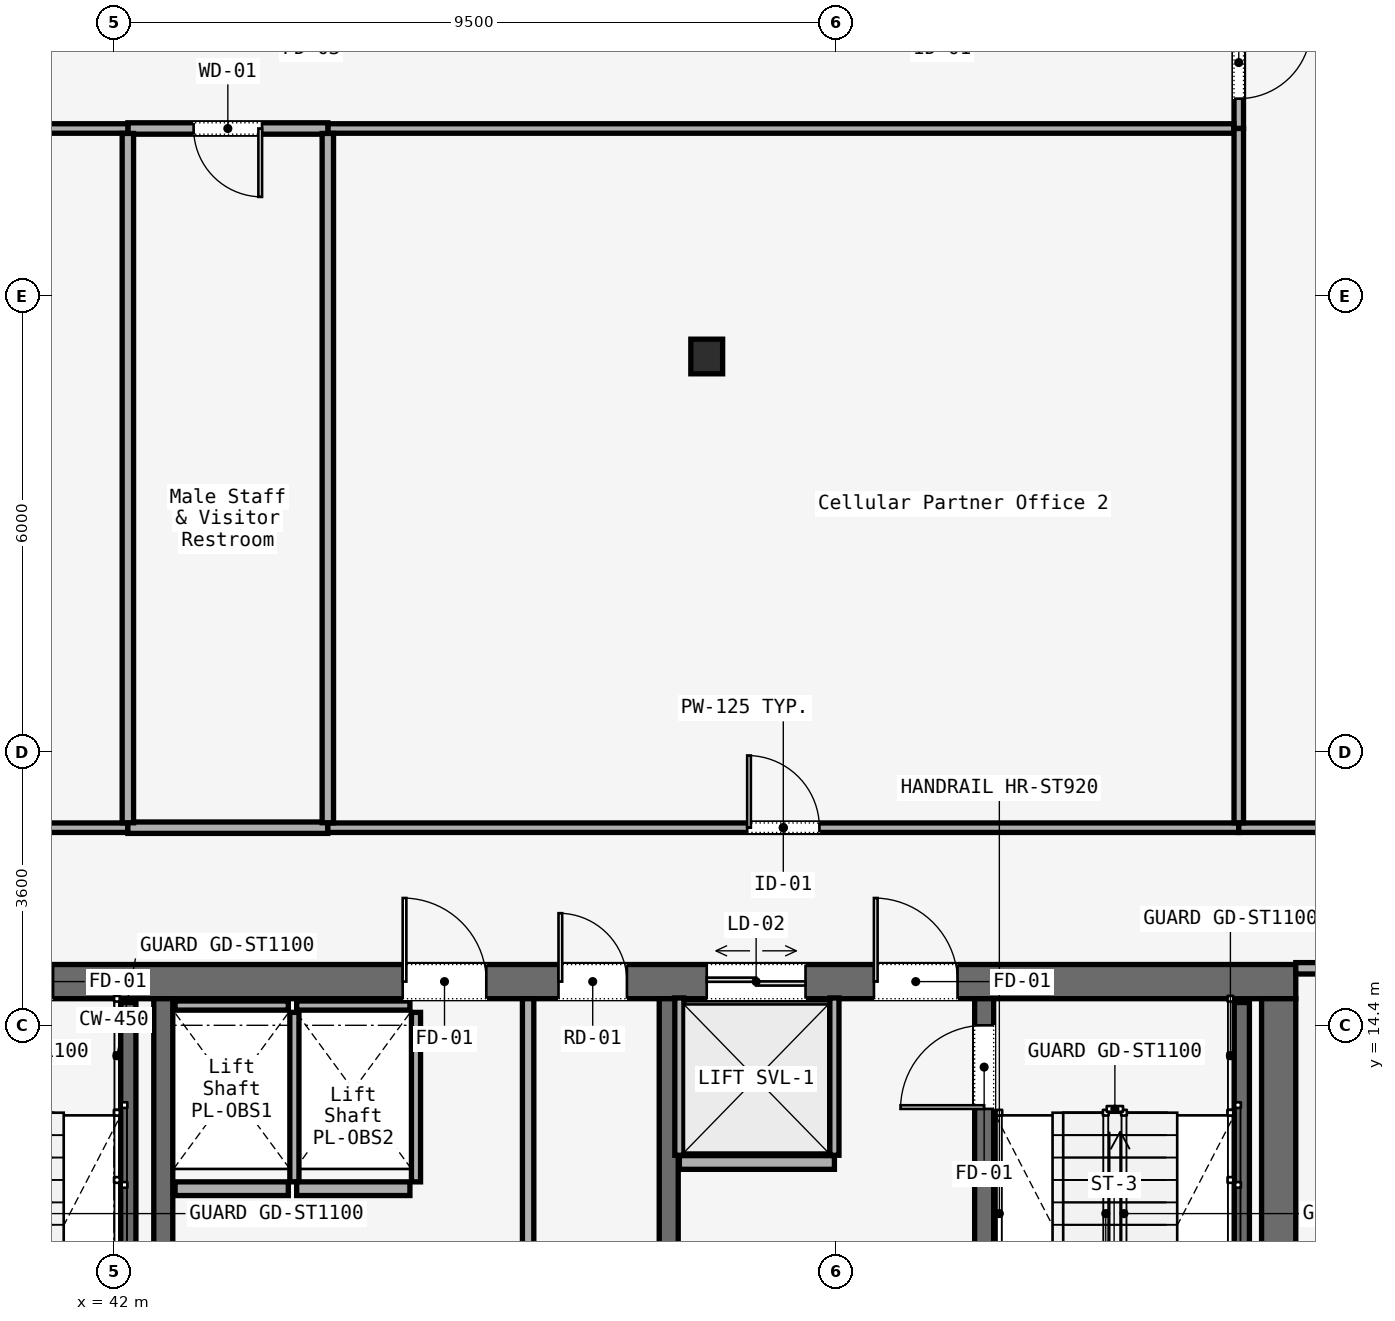
"""IFC4 building model, lengths in metres.
Left out: names, types, materials, properties, quantities, classifications, styles, units other than length and angle.
Written with IfcOpenShell. Run it as: python <this file> out.ifc"""

import sys

from ifc_helpers import new_model, si_unit, direction, frame, frame_2d, origin, origin_2d, place, context, subcontext, project, spatial, rectangle, i_section, extrude, element, fill, save


model = new_model("IFC4")
c1 = context("Model", 3, precision=1e-05, world=origin(), true_north=direction((0.0, 1.0)))
c2 = subcontext(c1, "Body", "Model", "MODEL_VIEW")
j1 = project(units=[si_unit("LENGTHUNIT", "METRE"), si_unit("PLANEANGLEUNIT", "RADIAN")], contexts=[c1])
p1 = place(None, origin())
s1 = spatial("IfcSite", under=j1, at=p1, CompositionType="ELEMENT")
p2 = place(p1, origin())
s2 = spatial("IfcBuilding", under=s1, at=p2, CompositionType="ELEMENT")
p3 = place(p2, frame((0.0, 0.0, 62.6)))
s3 = spatial("IfcBuildingStorey", under=s2, at=p3, CompositionType="ELEMENT", Elevation=62.6)
p4 = place(p3, frame((26.45, 14.975, 0.0), z_axis=(0.0, 0.0, 1.0), x_axis=(1.0, 0.0, 0.0)))
e1 = element("IfcWall", 1, at=p4, inside=s3, PredefinedType="SOLIDWALL", context=c2, shape_type="SweptSolid", body=[
    extrude(rectangle(XDim=31.1, YDim=0.45, at=frame_2d((15.55, 0.0))), origin(), (0.0, 0.0, 1.0), 3.58),
])
p5 = place(p4, frame((1.65, 0.0, 0.0)))
e2 = element("IfcOpeningElement", 2, at=p5, cuts=e1, PredefinedType="OPENING", context=c2, shape_type="SweptSolid", body=[
    extrude(rectangle(XDim=1.1, YDim=2.2, at=frame_2d((0.55, 1.1))), frame((0.0, 0.225, 0.0), z_axis=(0.0, -1.0, 0.0), x_axis=(1.0, 0.0, 0.0)), (0.0, 0.0, 1.0), 0.45),
])
p6 = place(p4, frame((13.65, 0.0, 0.0)))
e3 = element("IfcOpeningElement", 3, at=p6, cuts=e1, PredefinedType="OPENING", context=c2, shape_type="SweptSolid", body=[
    extrude(rectangle(XDim=1.1, YDim=2.2, at=frame_2d((0.55, 1.1))), frame((0.0, 0.225, 0.0), z_axis=(0.0, -1.0, 0.0), x_axis=(1.0, 0.0, 0.0)), (0.0, 0.0, 1.0), 0.45),
])
p7 = place(p4, frame((25.55, 0.0, 0.0)))
e4 = element("IfcOpeningElement", 4, at=p7, cuts=e1, PredefinedType="OPENING", context=c2, shape_type="SweptSolid", body=[
    extrude(rectangle(XDim=1.1, YDim=2.2, at=frame_2d((0.55, 1.1))), frame((0.0, 0.225, 0.0), z_axis=(0.0, -1.0, 0.0), x_axis=(1.0, 0.0, 0.0)), (0.0, 0.0, 1.0), 0.45),
])
p8 = place(p4, frame((10.7, 0.0, 0.0)))
e5 = element("IfcOpeningElement", 5, at=p8, cuts=e1, PredefinedType="OPENING", context=c2, shape_type="SweptSolid", body=[
    extrude(rectangle(XDim=1.4, YDim=2.2, at=frame_2d((0.7, 1.1))), frame((0.0, 0.225, 0.0), z_axis=(0.0, -1.0, 0.0), x_axis=(1.0, 0.0, 0.0)), (0.0, 0.0, 1.0), 0.45),
])
p9 = place(p4, frame((19.35, 0.0, 0.0)))
e6 = element("IfcOpeningElement", 6, at=p9, cuts=e1, PredefinedType="OPENING", context=c2, shape_type="SweptSolid", body=[
    extrude(rectangle(XDim=1.1, YDim=2.2, at=frame_2d((0.55, 1.1))), frame((0.0, 0.225, 0.0), z_axis=(0.0, -1.0, 0.0), x_axis=(1.0, 0.0, 0.0)), (0.0, 0.0, 1.0), 0.45),
])
p10 = place(p4, frame((21.4, 0.0, 0.0)))
e7 = element("IfcOpeningElement", 7, at=p10, cuts=e1, PredefinedType="OPENING", context=c2, shape_type="SweptSolid", body=[
    extrude(rectangle(XDim=0.9, YDim=2.1, at=frame_2d((0.45, 1.05))), frame((0.0, 0.225, 0.0), z_axis=(0.0, -1.0, 0.0), x_axis=(1.0, 0.0, 0.0)), (0.0, 0.0, 1.0), 0.45),
])
p11 = place(p4, frame((23.35, 0.0, 0.0)))
e8 = element("IfcOpeningElement", 8, at=p11, cuts=e1, PredefinedType="OPENING", context=c2, shape_type="SweptSolid", body=[
    extrude(rectangle(XDim=1.3, YDim=2.3, at=frame_2d((0.65, 1.15))), frame((0.0, 0.225, 0.0), z_axis=(0.0, -1.0, 0.0), x_axis=(1.0, 0.0, 0.0)), (0.0, 0.0, 1.0), 0.45),
])
p12 = place(p3, frame((57.325, 5.85, 0.0), z_axis=(0.0, 0.0, 1.0), x_axis=(0.0, 1.0, 0.0)))
e9 = element("IfcWall", 9, at=p12, inside=s3, PredefinedType="SOLIDWALL", context=c2, shape_type="SweptSolid", body=[
    extrude(rectangle(XDim=8.9, YDim=0.45, at=frame_2d((4.45, 0.0))), origin(), (0.0, 0.0, 1.0), 3.58),
])
for number, where, z_axis, x_axis in (
    (10, (42.65, 5.85, 0.0), (0.0, 0.0, 1.0), (0.0, 1.0, 0.0)),
    (11, (49.3, 5.85, 0.0), (0.0, 0.0, 1.0), (0.0, 1.0, 0.0)),
):
    element("IfcWall", number, at=place(p3, frame(where, z_axis=z_axis, x_axis=x_axis)), inside=s3, PredefinedType="SOLIDWALL", context=c2, shape_type="SweptSolid", body=[
        extrude(rectangle(XDim=8.9, YDim=0.25, at=frame_2d((4.45, 0.0))), origin(), (0.0, 0.0, 1.0), 3.58),
    ])
p13 = place(p3, frame((53.45, 5.85, 0.0), z_axis=(0.0, 0.0, 1.0), x_axis=(0.0, 1.0, 0.0)))
e12 = element("IfcWall", 12, at=p13, inside=s3, PredefinedType="SOLIDWALL", context=c2, shape_type="SweptSolid", body=[
    extrude(rectangle(XDim=8.9, YDim=0.25, at=frame_2d((4.45, 0.0))), origin(), (0.0, 0.0, 1.0), 3.58),
])
p14 = place(p13, frame((7.45, 0.0, 0.0)))
e13 = element("IfcOpeningElement", 13, at=p14, cuts=e12, PredefinedType="OPENING", context=c2, shape_type="SweptSolid", body=[
    extrude(rectangle(XDim=1.1, YDim=2.2, at=frame_2d((0.55, 1.1))), frame((0.0, 0.125, 0.0), z_axis=(0.0, -1.0, 0.0), x_axis=(1.0, 0.0, 0.0)), (0.0, 0.0, 1.0), 0.25),
])
p15 = place(p3, frame((49.8, 23.2, 0.0), z_axis=(0.0, 0.0, 1.0), x_axis=(1.0, 0.0, 0.0)))
e14 = element("IfcColumn", 14, at=p15, inside=s3, PredefinedType="COLUMN", context=c2, shape_type="SweptSolid", body=[
    extrude(i_section(OverallWidth=0.418, OverallDepth=0.456, WebThickness=0.042, FlangeThickness=0.067, FilletRadius=0.015, at=origin_2d()), origin(), (0.0, 0.0, 1.0), 3.58),
])
for number, where, z_axis, x_axis in (
    (15, (42.19, 14.7, 0.0), (0.0, 0.0, 1.0), (0.0, -1.0, 0.0)),
    (16, (56.84, 14.7, 0.0), (0.0, 0.0, 1.0), (0.0, -1.0, 0.0)),
):
    element("IfcWall", number, at=place(p3, frame(where, z_axis=z_axis, x_axis=x_axis)), inside=s3, PredefinedType="SOLIDWALL", context=c2, shape_type="SweptSolid", body=[
        extrude(rectangle(XDim=7.65, YDim=0.2, at=frame_2d((3.825, 0.0))), origin(), (0.0, 0.0, 1.0), 3.8),
    ])
p16 = place(p3, frame((47.45, 5.9, 0.0), z_axis=(0.0, 0.0, 1.0), x_axis=(0.0, 1.0, 0.0)))
e17 = element("IfcWall", 17, at=p16, inside=s3, PredefinedType="PARTITIONING", context=c2, shape_type="SweptSolid", body=[
    extrude(rectangle(XDim=8.85, YDim=0.15, at=frame_2d((4.425, 0.0))), origin(), (0.0, 0.0, 1.0), 2.933),
])
p17 = place(p3, frame((42.805, 12.25, 0.0), z_axis=(0.0, 0.0, 1.0), x_axis=(1.0, 0.0, 0.0)))
e18 = element("IfcWall", 18, at=p17, inside=s3, PredefinedType="SOLIDWALL", context=c2, shape_type="SweptSolid", body=[
    extrude(rectangle(XDim=1.49, YDim=0.18, at=frame_2d((0.745, 0.0))), origin(), (0.0, 0.0, 1.0), 2.933),
])
p18 = place(p3, frame((42.805, 14.66, 0.0), z_axis=(0.0, 0.0, 1.0), x_axis=(1.0, 0.0, 0.0)))
e19 = element("IfcWall", 19, at=p18, inside=s3, PredefinedType="SOLIDWALL", context=c2, shape_type="SweptSolid", body=[
    extrude(rectangle(XDim=1.49, YDim=0.12, at=frame_2d((0.745, 0.0))), origin(), (0.0, 0.0, 1.0), 2.933),
])
p19 = place(p3, frame((44.375, 12.34, 0.0), z_axis=(0.0, 0.0, 1.0), x_axis=(0.0, 1.0, 0.0)))
e20 = element("IfcWall", 20, at=p19, inside=s3, PredefinedType="SOLIDWALL", context=c2, shape_type="SweptSolid", body=[
    extrude(rectangle(XDim=2.23, YDim=0.12, at=frame_2d((1.115, 0.0))), origin(), (0.0, 0.0, 1.0), 2.933),
])
p20 = place(p3, frame((44.405, 12.25, 0.0), z_axis=(0.0, 0.0, 1.0), x_axis=(1.0, 0.0, 0.0)))
e21 = element("IfcWall", 21, at=p20, inside=s3, PredefinedType="SOLIDWALL", context=c2, shape_type="SweptSolid", body=[
    extrude(rectangle(XDim=1.49, YDim=0.18, at=frame_2d((0.745, 0.0))), origin(), (0.0, 0.0, 1.0), 2.933),
])
p21 = place(p3, frame((44.405, 14.66, 0.0), z_axis=(0.0, 0.0, 1.0), x_axis=(1.0, 0.0, 0.0)))
e22 = element("IfcWall", 22, at=p21, inside=s3, PredefinedType="SOLIDWALL", context=c2, shape_type="SweptSolid", body=[
    extrude(rectangle(XDim=1.49, YDim=0.12, at=frame_2d((0.745, 0.0))), origin(), (0.0, 0.0, 1.0), 2.933),
])
p22 = place(p3, frame((45.975, 12.34, 0.0), z_axis=(0.0, 0.0, 1.0), x_axis=(0.0, 1.0, 0.0)))
e23 = element("IfcWall", 23, at=p22, inside=s3, PredefinedType="SOLIDWALL", context=c2, shape_type="SweptSolid", body=[
    extrude(rectangle(XDim=2.23, YDim=0.12, at=frame_2d((1.115, 0.0))), origin(), (0.0, 0.0, 1.0), 2.933),
])
p23 = place(p3, frame((49.44, 12.595, 0.0), z_axis=(0.0, 0.0, 1.0), x_axis=(1.0, 0.0, 0.0)))
e24 = element("IfcWall", 24, at=p23, inside=s3, PredefinedType="SOLIDWALL", context=c2, shape_type="SweptSolid", body=[
    extrude(rectangle(XDim=2.04, YDim=0.18, at=frame_2d((1.02, 0.0))), origin(), (0.0, 0.0, 1.0), 2.933),
])
for number, where, z_axis, x_axis in (
    (25, (49.44, 12.69, 0.0), (0.0, 0.0, 1.0), (0.0, 1.0, 0.0)),
    (26, (51.48, 12.69, 0.0), (0.0, 0.0, 1.0), (0.0, 1.0, 0.0)),
):
    element("IfcWall", number, at=place(p3, frame(where, z_axis=z_axis, x_axis=x_axis)), inside=s3, PredefinedType="SOLIDWALL", context=c2, shape_type="SweptSolid", body=[
        extrude(rectangle(XDim=2.07, YDim=0.12, at=frame_2d((1.035, 0.0))), origin(), (0.0, 0.0, 1.0), 2.933),
    ])
p24 = place(p3, frame((58.335, 15.15, 0.0), z_axis=(0.0, 0.0, 1.0), x_axis=(-1.0, 0.0, 0.0)))
e27 = element("IfcWall", 27, at=p24, inside=s3, PredefinedType="PARTITIONING", context=c2, shape_type="SweptSolid", body=[
    extrude(rectangle(XDim=0.785, YDim=0.15, at=frame_2d((0.393, 0.0))), origin(), (0.0, 0.0, 1.0), 2.933),
])
p25 = place(p3, frame((56.8, 27.935, 0.0), z_axis=(0.0, 0.0, 1.0), x_axis=(0.0, -1.0, 0.0)))
e28 = element("IfcWall", 28, at=p25, inside=s3, PredefinedType="PARTITIONING", context=c2, shape_type="SweptSolid", body=[
    extrude(rectangle(XDim=1.735, YDim=0.125, at=frame_2d((0.868, 0.0))), origin(), (0.0, 0.0, 1.0), 2.933),
])
p26 = place(p25, frame((0.393, 0.0, 0.0)))
e29 = element("IfcOpeningElement", 29, at=p26, cuts=e28, PredefinedType="OPENING", context=c2, shape_type="SweptSolid", body=[
    extrude(rectangle(XDim=0.95, YDim=2.2, at=frame_2d((0.475, 1.1))), frame((0.0, 0.062, 0.0), z_axis=(0.0, -1.0, 0.0), x_axis=(1.0, 0.0, 0.0)), (0.0, 0.0, 1.0), 0.125),
])
p27 = place(p3, frame((56.735, 26.2, 0.0), z_axis=(0.0, 0.0, 1.0), x_axis=(-1.0, 0.0, 0.0)))
e30 = element("IfcWall", 30, at=p27, inside=s3, PredefinedType="PARTITIONING", context=c2, shape_type="SweptSolid", body=[
    extrude(rectangle(XDim=11.92, YDim=0.125, at=frame_2d((5.96, 0.0))), origin(), (0.0, 0.0, 1.0), 2.933),
])
p28 = place(p3, frame((44.815, 26.2, 0.0), z_axis=(0.0, 0.0, 1.0), x_axis=(-1.0, 0.0, 0.0)))
e31 = element("IfcWall", 31, at=p28, inside=s3, PredefinedType="PARTITIONING", context=c2, shape_type="SweptSolid", body=[
    extrude(rectangle(XDim=2.631, YDim=0.15, at=frame_2d((1.315, 0.0))), origin(), (0.0, 0.0, 1.0), 2.933),
])
p29 = place(p28, frame((0.865, 0.0, 0.0)))
e32 = element("IfcOpeningElement", 32, at=p29, cuts=e31, PredefinedType="OPENING", context=c2, shape_type="SweptSolid", body=[
    extrude(rectangle(XDim=0.9, YDim=2.15, at=frame_2d((0.45, 1.075))), frame((0.0, 0.075, 0.0), z_axis=(0.0, -1.0, 0.0), x_axis=(1.0, 0.0, 0.0)), (0.0, 0.0, 1.0), 0.15),
])
p30 = place(p3, frame((42.184, 26.2, 0.0), z_axis=(0.0, 0.0, 1.0), x_axis=(-1.0, 0.0, 0.0)))
e33 = element("IfcWall", 33, at=p30, inside=s3, PredefinedType="PARTITIONING", context=c2, shape_type="SweptSolid", body=[
    extrude(rectangle(XDim=10.584, YDim=0.125, at=frame_2d((5.292, 0.0))), origin(), (0.0, 0.0, 1.0), 2.933),
])
p31 = place(p30, frame((4.817, 0.0, 0.0)))
e34 = element("IfcOpeningElement", 34, at=p31, cuts=e33, PredefinedType="OPENING", context=c2, shape_type="SweptSolid", body=[
    extrude(rectangle(XDim=0.95, YDim=2.2, at=frame_2d((0.475, 1.1))), frame((0.0, 0.062, 0.0), z_axis=(0.0, -1.0, 0.0), x_axis=(1.0, 0.0, 0.0)), (0.0, 0.0, 1.0), 0.125),
])
p32 = place(p3, frame((31.665, 17.0, 0.0), z_axis=(0.0, 0.0, 1.0), x_axis=(1.0, 0.0, 0.0)))
e35 = element("IfcWall", 35, at=p32, inside=s3, PredefinedType="PARTITIONING", context=c2, shape_type="SweptSolid", body=[
    extrude(rectangle(XDim=10.519, YDim=0.125, at=frame_2d((5.26, 0.0))), origin(), (0.0, 0.0, 1.0), 2.933),
])
p33 = place(p3, frame((42.184, 17.0, 0.0), z_axis=(0.0, 0.0, 1.0), x_axis=(1.0, 0.0, 0.0)))
e36 = element("IfcWall", 36, at=p33, inside=s3, PredefinedType="PARTITIONING", context=c2, shape_type="SweptSolid", body=[
    extrude(rectangle(XDim=2.631, YDim=0.15, at=frame_2d((1.315, 0.0))), origin(), (0.0, 0.0, 1.0), 2.933),
])
p34 = place(p3, frame((44.815, 17.0, 0.0), z_axis=(0.0, 0.0, 1.0), x_axis=(1.0, 0.0, 0.0)))
e37 = element("IfcWall", 37, at=p34, inside=s3, PredefinedType="PARTITIONING", context=c2, shape_type="SweptSolid", body=[
    extrude(rectangle(XDim=11.985, YDim=0.125, at=frame_2d((5.993, 0.0))), origin(), (0.0, 0.0, 1.0), 2.933),
])
p35 = place(p34, frame((5.518, 0.0, 0.0)))
e38 = element("IfcOpeningElement", 38, at=p35, cuts=e37, PredefinedType="OPENING", context=c2, shape_type="SweptSolid", body=[
    extrude(rectangle(XDim=0.95, YDim=2.2, at=frame_2d((0.475, 1.1))), frame((0.0, 0.062, 0.0), z_axis=(0.0, -1.0, 0.0), x_axis=(1.0, 0.0, 0.0)), (0.0, 0.0, 1.0), 0.125),
])
p36 = place(p3, frame((56.8, 17.0, 0.0), z_axis=(0.0, 0.0, 1.0), x_axis=(1.0, 0.0, 0.0)))
e39 = element("IfcWall", 39, at=p36, inside=s3, PredefinedType="PARTITIONING", context=c2, shape_type="SweptSolid", body=[
    extrude(rectangle(XDim=1.535, YDim=0.125, at=frame_2d((0.768, 0.0))), origin(), (0.0, 0.0, 1.0), 2.933),
])
for number, where, z_axis, x_axis in (
    (40, (42.184, 26.135, 0.0), (0.0, 0.0, 1.0), (0.0, -1.0, 0.0)),
    (41, (44.815, 26.135, 0.0), (0.0, 0.0, 1.0), (0.0, -1.0, 0.0)),
):
    element("IfcWall", number, at=place(p3, frame(where, z_axis=z_axis, x_axis=x_axis)), inside=s3, PredefinedType="PARTITIONING", context=c2, shape_type="SweptSolid", body=[
        extrude(rectangle(XDim=9.07, YDim=0.15, at=frame_2d((4.535, 0.0))), origin(), (0.0, 0.0, 1.0), 2.933),
    ])
p37 = place(p3, frame((56.8, 26.2, 0.0), z_axis=(0.0, 0.0, 1.0), x_axis=(0.0, -1.0, 0.0)))
e42 = element("IfcWall", 42, at=p37, inside=s3, PredefinedType="PARTITIONING", context=c2, shape_type="SweptSolid", body=[
    extrude(rectangle(XDim=9.135, YDim=0.125, at=frame_2d((4.567, 0.0))), origin(), (0.0, 0.0, 1.0), 2.933),
])
p38 = place(p6, origin())
e43 = element("IfcDoor", 43, at=p38, inside=s3, OperationType="SINGLE_SWING_LEFT", PredefinedType="DOOR", context=c2, shape_type="SweptSolid", body=[
    extrude(rectangle(XDim=1.1, YDim=2.2, at=frame_2d((0.55, 1.1))), frame((0.0, 0.025, 0.0), z_axis=(0.0, -1.0, 0.0), x_axis=(1.0, 0.0, 0.0)), (0.0, 0.0, 1.0), 0.05),
])
fill(e3, e43)
p39 = place(p7, origin())
e44 = element("IfcDoor", 44, at=p39, inside=s3, OperationType="SINGLE_SWING_RIGHT", PredefinedType="DOOR", context=c2, shape_type="SweptSolid", body=[
    extrude(rectangle(XDim=1.1, YDim=2.2, at=frame_2d((0.55, 1.1))), frame((0.0, 0.025, 0.0), z_axis=(0.0, -1.0, 0.0), x_axis=(1.0, 0.0, 0.0)), (0.0, 0.0, 1.0), 0.05),
])
fill(e4, e44)
p40 = place(p9, origin())
e45 = element("IfcDoor", 45, at=p40, inside=s3, OperationType="SINGLE_SWING_LEFT", PredefinedType="DOOR", context=c2, shape_type="SweptSolid", body=[
    extrude(rectangle(XDim=1.1, YDim=2.2, at=frame_2d((0.55, 1.1))), frame((0.0, 0.025, 0.0), z_axis=(0.0, -1.0, 0.0), x_axis=(1.0, 0.0, 0.0)), (0.0, 0.0, 1.0), 0.05),
])
fill(e6, e45)
p41 = place(p10, origin())
e46 = element("IfcDoor", 46, at=p41, inside=s3, OperationType="SINGLE_SWING_LEFT", PredefinedType="DOOR", context=c2, shape_type="SweptSolid", body=[
    extrude(rectangle(XDim=0.9, YDim=2.1, at=frame_2d((0.45, 1.05))), frame((0.0, 0.025, 0.0), z_axis=(0.0, -1.0, 0.0), x_axis=(1.0, 0.0, 0.0)), (0.0, 0.0, 1.0), 0.05),
])
fill(e7, e46)
p42 = place(p14, origin())
e47 = element("IfcDoor", 47, at=p42, inside=s3, OperationType="SINGLE_SWING_LEFT", PredefinedType="DOOR", context=c2, shape_type="SweptSolid", body=[
    extrude(rectangle(XDim=1.1, YDim=2.2, at=frame_2d((0.55, 1.1))), frame((0.0, 0.025, 0.0), z_axis=(0.0, -1.0, 0.0), x_axis=(1.0, 0.0, 0.0)), (0.0, 0.0, 1.0), 0.05),
])
fill(e13, e47)
p43 = place(p11, origin())
e48 = element("IfcDoor", 48, at=p43, inside=s3, OperationType="DOUBLE_DOOR_SLIDING", PredefinedType="DOOR", context=c2, shape_type="SweptSolid", body=[
    extrude(rectangle(XDim=1.3, YDim=2.3, at=frame_2d((0.65, 1.15))), frame((0.0, 0.025, 0.0), z_axis=(0.0, -1.0, 0.0), x_axis=(1.0, 0.0, 0.0)), (0.0, 0.0, 1.0), 0.05),
])
fill(e8, e48)
p44 = place(p29, origin())
e49 = element("IfcDoor", 49, at=p44, inside=s3, OperationType="SINGLE_SWING_RIGHT", PredefinedType="DOOR", context=c2, shape_type="SweptSolid", body=[
    extrude(rectangle(XDim=0.9, YDim=2.15, at=frame_2d((0.45, 1.075))), frame((0.0, 0.025, 0.0), z_axis=(0.0, -1.0, 0.0), x_axis=(1.0, 0.0, 0.0)), (0.0, 0.0, 1.0), 0.05),
])
fill(e32, e49)
p45 = place(p35, origin())
e50 = element("IfcDoor", 50, at=p45, inside=s3, OperationType="SINGLE_SWING_LEFT", PredefinedType="DOOR", context=c2, shape_type="SweptSolid", body=[
    extrude(rectangle(XDim=0.95, YDim=2.2, at=frame_2d((0.475, 1.1))), frame((0.0, 0.025, 0.0), z_axis=(0.0, -1.0, 0.0), x_axis=(1.0, 0.0, 0.0)), (0.0, 0.0, 1.0), 0.05),
])
fill(e38, e50)
p46 = place(p26, origin())
e51 = element("IfcDoor", 51, at=p46, inside=s3, OperationType="SINGLE_SWING_RIGHT", PredefinedType="DOOR", context=c2, shape_type="SweptSolid", body=[
    extrude(rectangle(XDim=0.95, YDim=2.2, at=frame_2d((0.475, 1.1))), frame((0.0, 0.025, 0.0), z_axis=(0.0, -1.0, 0.0), x_axis=(1.0, 0.0, 0.0)), (0.0, 0.0, 1.0), 0.05),
])
fill(e29, e51)
save(model, sys.argv[1])
